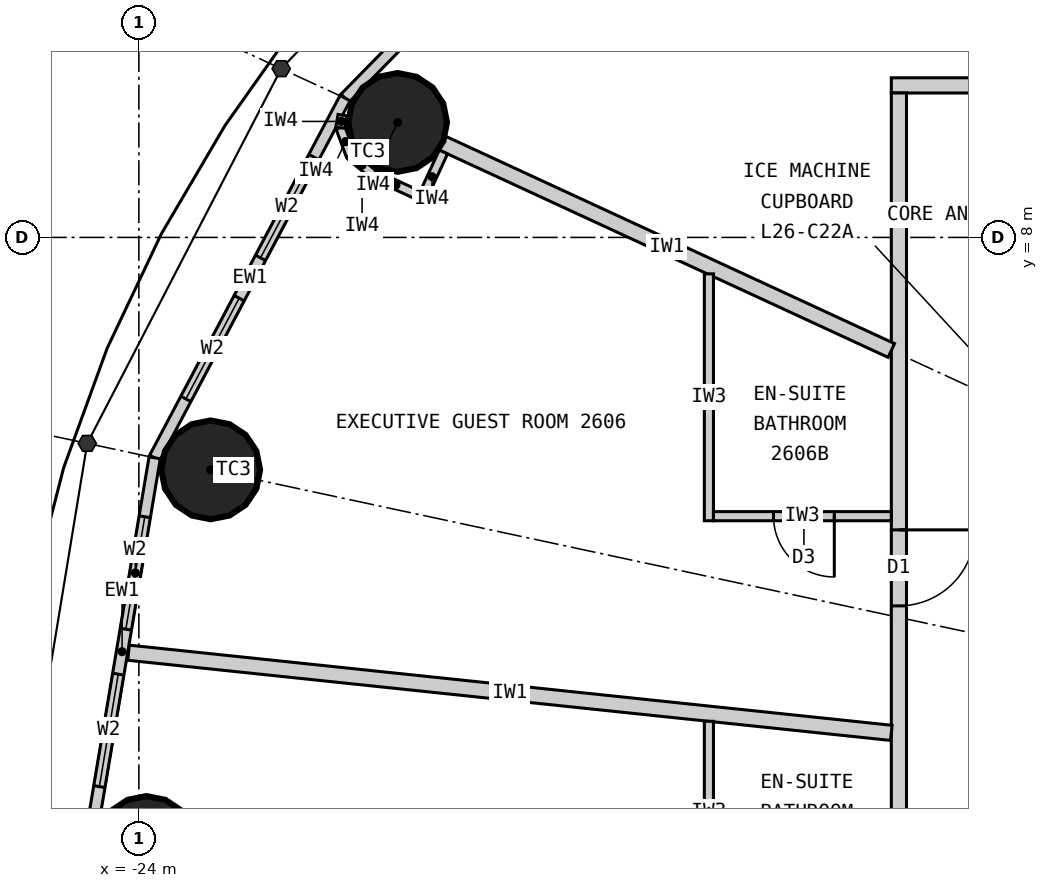
"""IFC4 building model, lengths in metres.
Left out: names, types, materials, properties, quantities, classifications, styles, units other than length and angle.
Written with IfcOpenShell. Run it as: python <this file> out.ifc"""

import sys

from ifc_helpers import new_model, si_unit, direction, frame, frame_2d, origin, origin_2d, place, context, subcontext, project, spatial, rectangle, circle, extrude, element, fill, save


model = new_model("IFC4")
c1 = context("Model", 3, precision=1e-05, world=origin(), true_north=direction((0.0, 1.0)))
c2 = subcontext(c1, "Body", "Model", "MODEL_VIEW")
j1 = project(units=[si_unit("LENGTHUNIT", "METRE"), si_unit("PLANEANGLEUNIT", "RADIAN")], contexts=[c1])
p1 = place(None, origin())
s1 = spatial("IfcSite", under=j1, at=p1, CompositionType="ELEMENT")
p2 = place(p1, origin())
s2 = spatial("IfcBuilding", under=s1, at=p2, CompositionType="ELEMENT")
p3 = place(p2, frame((0.0, 0.0, 105.6)))
s3 = spatial("IfcBuildingStorey", under=s2, at=p3, CompositionType="ELEMENT", Elevation=105.6)
for number, where, z_axis, x_axis in (
    (1, (-20.596, 9.513, 0.0), (0.0, 0.0, 1.0), (1.0, 0.0, 0.0)),
    (2, (-23.055, 4.942, 0.0), (0.0, 0.0, 1.0), (1.0, 0.0, 0.0)),
    (3, (-23.9, 0.0, 0.0), (0.0, 0.0, 1.0), (1.0, 0.0, 0.0)),
):
    element("IfcColumn", number, at=place(p3, frame(where, z_axis=z_axis, x_axis=x_axis)), inside=s3, PredefinedType="COLUMN", context=c2, shape_type="SweptSolid", body=[
        extrude(circle(Radius=0.65, at=origin_2d()), origin(), (0.0, 0.0, 1.0), 3.3),
    ])
p4 = place(p3, frame((-17.332, 13.866, 0.0), z_axis=(0.0, 0.0, 1.0), x_axis=(-0.700136650834, -0.714008872605, 0.0)))
e4 = element("IfcWall", 4, at=p4, inside=s3, PredefinedType="ELEMENTEDWALL", context=c2, shape_type="SweptSolid", body=[
    extrude(rectangle(XDim=5.649, YDim=0.15, at=frame_2d((2.825, 0.0))), origin(), (0.0, 0.0, 1.0), 3.12),
])
p5 = place(p4, frame((1.025, 0.0, 0.9)))
e5 = element("IfcOpeningElement", 5, at=p5, cuts=e4, PredefinedType="OPENING", context=c2, shape_type="SweptSolid", body=[
    extrude(rectangle(XDim=1.5, YDim=1.9, at=frame_2d((0.75, 0.95))), frame((0.0, 0.085, 0.0), z_axis=(0.0, -1.0, 0.0), x_axis=(1.0, 0.0, 0.0)), (0.0, 0.0, 1.0), 0.17),
])
p6 = place(p4, frame((3.125, 0.0, 0.9)))
e6 = element("IfcOpeningElement", 6, at=p6, cuts=e4, PredefinedType="OPENING", context=c2, shape_type="SweptSolid", body=[
    extrude(rectangle(XDim=1.5, YDim=1.9, at=frame_2d((0.75, 0.95))), frame((0.0, 0.085, 0.0), z_axis=(0.0, -1.0, 0.0), x_axis=(1.0, 0.0, 0.0)), (0.0, 0.0, 1.0), 0.17),
])
p7 = place(p3, frame((-21.287, 9.832, 0.0), z_axis=(0.0, 0.0, 1.0), x_axis=(-0.467814388454, -0.883826735257, 0.0)))
e7 = element("IfcWall", 7, at=p7, inside=s3, PredefinedType="ELEMENTEDWALL", context=c2, shape_type="SweptSolid", body=[
    extrude(rectangle(XDim=5.354, YDim=0.15, at=frame_2d((2.677, 0.0))), origin(), (0.0, 0.0, 1.0), 3.12),
])
p8 = place(p7, frame((0.877, 0.0, 0.9)))
e8 = element("IfcOpeningElement", 8, at=p8, cuts=e7, PredefinedType="OPENING", context=c2, shape_type="SweptSolid", body=[
    extrude(rectangle(XDim=1.5, YDim=1.9, at=frame_2d((0.75, 0.95))), frame((0.0, 0.085, 0.0), z_axis=(0.0, -1.0, 0.0), x_axis=(1.0, 0.0, 0.0)), (0.0, 0.0, 1.0), 0.17),
])
p9 = place(p7, frame((2.977, 0.0, 0.9)))
e9 = element("IfcOpeningElement", 9, at=p9, cuts=e7, PredefinedType="OPENING", context=c2, shape_type="SweptSolid", body=[
    extrude(rectangle(XDim=1.5, YDim=1.9, at=frame_2d((0.75, 0.95))), frame((0.0, 0.085, 0.0), z_axis=(0.0, -1.0, 0.0), x_axis=(1.0, 0.0, 0.0)), (0.0, 0.0, 1.0), 0.17),
])
p10 = place(p3, frame((-23.792, 5.1, 0.0), z_axis=(0.0, 0.0, 1.0), x_axis=(-0.165883894218, -0.986145290329, 0.0)))
e10 = element("IfcWall", 10, at=p10, inside=s3, PredefinedType="ELEMENTEDWALL", context=c2, shape_type="SweptSolid", body=[
    extrude(rectangle(XDim=5.172, YDim=0.15, at=frame_2d((2.586, 0.0))), origin(), (0.0, 0.0, 1.0), 3.12),
])
p11 = place(p10, frame((0.786, 0.0, 0.9)))
e11 = element("IfcOpeningElement", 11, at=p11, cuts=e10, PredefinedType="OPENING", context=c2, shape_type="SweptSolid", body=[
    extrude(rectangle(XDim=1.5, YDim=1.9, at=frame_2d((0.75, 0.95))), frame((0.0, 0.085, 0.0), z_axis=(0.0, -1.0, 0.0), x_axis=(1.0, 0.0, 0.0)), (0.0, 0.0, 1.0), 0.17),
])
p12 = place(p10, frame((2.886, 0.0, 0.9)))
e12 = element("IfcOpeningElement", 12, at=p12, cuts=e10, PredefinedType="OPENING", context=c2, shape_type="SweptSolid", body=[
    extrude(rectangle(XDim=1.5, YDim=1.9, at=frame_2d((0.75, 0.95))), frame((0.0, 0.085, 0.0), z_axis=(0.0, -1.0, 0.0), x_axis=(1.0, 0.0, 0.0)), (0.0, 0.0, 1.0), 0.17),
])
p13 = place(p3, frame((-14.1, 10.0, 0.0), z_axis=(0.0, 0.0, 1.0), x_axis=(1.0, 0.0, 0.0)))
e13 = element("IfcWall", 13, at=p13, inside=s3, PredefinedType="PARTITIONING", context=c2, shape_type="SweptSolid", body=[
    extrude(rectangle(XDim=10.817, YDim=0.2, at=frame_2d((5.409, 0.0))), origin(), (0.0, 0.0, 1.0), 3.12),
])
p14 = place(p13, frame((2.801, 0.0, 0.0)))
e14 = element("IfcOpeningElement", 14, at=p14, cuts=e13, PredefinedType="OPENING", context=c2, shape_type="SweptSolid", body=[
    extrude(rectangle(XDim=1.0, YDim=2.2, at=frame_2d((0.5, 1.1))), frame((0.0, 0.11, 0.0), z_axis=(0.0, -1.0, 0.0), x_axis=(1.0, 0.0, 0.0)), (0.0, 0.0, 1.0), 0.22),
])
p15 = place(p3, frame((-14.0, 9.9, 0.0), z_axis=(0.0, 0.0, 1.0), x_axis=(0.0, -1.0, 0.0)))
e15 = element("IfcWall", 15, at=p15, inside=s3, PredefinedType="PARTITIONING", context=c2, shape_type="SweptSolid", body=[
    extrude(rectangle(XDim=19.8, YDim=0.2, at=frame_2d((9.9, 0.0))), origin(), (0.0, 0.0, 1.0), 3.12),
])
p16 = place(p15, frame((5.748, 0.0, 0.0)))
e16 = element("IfcOpeningElement", 16, at=p16, cuts=e15, PredefinedType="OPENING", context=c2, shape_type="SweptSolid", body=[
    extrude(rectangle(XDim=1.0, YDim=2.2, at=frame_2d((0.5, 1.1))), frame((0.0, 0.11, 0.0), z_axis=(0.0, -1.0, 0.0), x_axis=(1.0, 0.0, 0.0)), (0.0, 0.0, 1.0), 0.22),
])
p17 = place(p15, frame((10.778, 0.0, 0.0)))
e17 = element("IfcOpeningElement", 17, at=p17, cuts=e15, PredefinedType="OPENING", context=c2, shape_type="SweptSolid", body=[
    extrude(rectangle(XDim=1.0, YDim=2.2, at=frame_2d((0.5, 1.1))), frame((0.0, 0.11, 0.0), z_axis=(0.0, -1.0, 0.0), x_axis=(1.0, 0.0, 0.0)), (0.0, 0.0, 1.0), 0.22),
])
p18 = place(p15, frame((15.282, 0.0, 0.0)))
e18 = element("IfcOpeningElement", 18, at=p18, cuts=e15, PredefinedType="OPENING", context=c2, shape_type="SweptSolid", body=[
    extrude(rectangle(XDim=1.0, YDim=2.2, at=frame_2d((0.5, 1.1))), frame((0.0, 0.11, 0.0), z_axis=(0.0, -1.0, 0.0), x_axis=(1.0, 0.0, 0.0)), (0.0, 0.0, 1.0), 0.22),
])
p19 = place(p3, frame((-14.1, 6.512, 0.0), z_axis=(0.0, 0.0, 1.0), x_axis=(-0.907833019998, 0.419331858797, 0.0)))
e19 = element("IfcWall", 19, at=p19, inside=s3, PredefinedType="PARTITIONING", context=c2, shape_type="SweptSolid", body=[
    extrude(rectangle(XDim=6.505, YDim=0.2, at=frame_2d((3.252, 0.0))), origin(), (0.0, 0.0, 1.0), 2.22),
])
p20 = place(p3, frame((-14.1, 1.482, 0.0), z_axis=(0.0, 0.0, 1.0), x_axis=(-0.994523202615, 0.104516024894, 0.0)))
e20 = element("IfcWall", 20, at=p20, inside=s3, PredefinedType="PARTITIONING", context=c2, shape_type="SweptSolid", body=[
    extrude(rectangle(XDim=10.091, YDim=0.2, at=frame_2d((5.045, 0.0))), origin(), (0.0, 0.0, 1.0), 2.37),
])
p21 = place(p3, frame((-16.5, 7.521, 0.0), z_axis=(0.0, 0.0, 1.0), x_axis=(0.0, -1.0, 0.0)))
e21 = element("IfcWall", 21, at=p21, inside=s3, PredefinedType="PARTITIONING", context=c2, shape_type="SweptSolid", body=[
    extrude(rectangle(XDim=3.249, YDim=0.12, at=frame_2d((1.624, 0.0))), origin(), (0.0, 0.0, 1.0), 3.12),
])
p22 = place(p3, frame((-14.1, 4.333, 0.0), z_axis=(0.0, 0.0, 1.0), x_axis=(-1.0, 0.0, 0.0)))
e22 = element("IfcWall", 22, at=p22, inside=s3, PredefinedType="PARTITIONING", context=c2, shape_type="SweptSolid", body=[
    extrude(rectangle(XDim=2.34, YDim=0.12, at=frame_2d((1.17, 0.0))), origin(), (0.0, 0.0, 1.0), 3.12),
])
p23 = place(p22, frame((0.75, 0.0, 0.0)))
e23 = element("IfcOpeningElement", 23, at=p23, cuts=e22, PredefinedType="OPENING", context=c2, shape_type="SweptSolid", body=[
    extrude(rectangle(XDim=0.8, YDim=2.1, at=frame_2d((0.4, 1.05))), frame((0.0, 0.07, 0.0), z_axis=(0.0, -1.0, 0.0), x_axis=(1.0, 0.0, 0.0)), (0.0, 0.0, 1.0), 0.14),
])
p24 = place(p3, frame((-16.5, 1.634, 0.0), z_axis=(0.0, 0.0, 1.0), x_axis=(0.0, -1.0, 0.0)))
e24 = element("IfcWall", 24, at=p24, inside=s3, PredefinedType="PARTITIONING", context=c2, shape_type="SweptSolid", body=[
    extrude(rectangle(XDim=2.392, YDim=0.12, at=frame_2d((1.196, 0.0))), origin(), (0.0, 0.0, 1.0), 3.12),
])
p25 = place(p3, frame((-19.993, 9.124, 0.0), z_axis=(0.0, 0.0, 1.0), x_axis=(-0.419447394118, -0.90777964483, 0.0)))
e25 = element("IfcWall", 25, at=p25, inside=s3, PredefinedType="PARTITIONING", context=c2, shape_type="SweptSolid", body=[
    extrude(rectangle(XDim=0.716, YDim=0.12, at=frame_2d((0.358, 0.0))), origin(), (0.0, 0.0, 1.0), 3.12),
])
p26 = place(p3, frame((-20.323, 8.554, 0.0), z_axis=(0.0, 0.0, 1.0), x_axis=(-0.907750418698, 0.419510640333, 0.0)))
e26 = element("IfcWall", 26, at=p26, inside=s3, PredefinedType="PARTITIONING", context=c2, shape_type="SweptSolid", body=[
    extrude(rectangle(XDim=0.65, YDim=0.12, at=frame_2d((0.325, 0.0))), origin(), (0.0, 0.0, 1.0), 3.12),
])
p27 = place(p3, frame((-20.913, 8.827, 0.0), z_axis=(0.0, 0.0, 1.0), x_axis=(-0.76847706684, 0.639877330229, 0.0)))
e27 = element("IfcWall", 27, at=p27, inside=s3, PredefinedType="PARTITIONING", context=c2, shape_type="SweptSolid", body=[
    extrude(rectangle(XDim=0.391, YDim=0.12, at=frame_2d((0.196, 0.0))), origin(), (0.0, 0.0, 1.0), 3.12),
])
p28 = place(p3, frame((-21.213, 9.077, 0.0), z_axis=(0.0, 0.0, 1.0), x_axis=(-0.345647532133, 0.938364419365, 0.0)))
e28 = element("IfcWall", 28, at=p28, inside=s3, PredefinedType="PARTITIONING", context=c2, shape_type="SweptSolid", body=[
    extrude(rectangle(XDim=0.391, YDim=0.12, at=frame_2d((0.196, 0.0))), origin(), (0.0, 0.0, 1.0), 3.12),
])
p29 = place(p3, frame((-21.348, 9.444, 0.0), z_axis=(0.0, 0.0, 1.0), x_axis=(0.170349493321, 0.985383707053, 0.0)))
e29 = element("IfcWall", 29, at=p29, inside=s3, PredefinedType="PARTITIONING", context=c2, shape_type="SweptSolid", body=[
    extrude(rectangle(XDim=0.166, YDim=0.12, at=frame_2d((0.083, 0.0))), origin(), (0.0, 0.0, 1.0), 3.12),
])
p30 = place(p8, origin())
e30 = element("IfcWindow", 30, at=p30, inside=s3, PartitioningType="SINGLE_PANEL", PredefinedType="WINDOW", context=c2, shape_type="SweptSolid", body=[
    extrude(rectangle(XDim=1.5, YDim=1.9, at=frame_2d((0.75, 0.95))), frame((0.0, 0.03, 0.0), z_axis=(0.0, -1.0, 0.0), x_axis=(1.0, 0.0, 0.0)), (0.0, 0.0, 1.0), 0.06),
])
fill(e8, e30)
p31 = place(p9, origin())
e31 = element("IfcWindow", 31, at=p31, inside=s3, PartitioningType="SINGLE_PANEL", PredefinedType="WINDOW", context=c2, shape_type="SweptSolid", body=[
    extrude(rectangle(XDim=1.5, YDim=1.9, at=frame_2d((0.75, 0.95))), frame((0.0, 0.03, 0.0), z_axis=(0.0, -1.0, 0.0), x_axis=(1.0, 0.0, 0.0)), (0.0, 0.0, 1.0), 0.06),
])
fill(e9, e31)
p32 = place(p11, origin())
e32 = element("IfcWindow", 32, at=p32, inside=s3, PartitioningType="SINGLE_PANEL", PredefinedType="WINDOW", context=c2, shape_type="SweptSolid", body=[
    extrude(rectangle(XDim=1.5, YDim=1.9, at=frame_2d((0.75, 0.95))), frame((0.0, 0.03, 0.0), z_axis=(0.0, -1.0, 0.0), x_axis=(1.0, 0.0, 0.0)), (0.0, 0.0, 1.0), 0.06),
])
fill(e11, e32)
p33 = place(p12, origin())
e33 = element("IfcWindow", 33, at=p33, inside=s3, PartitioningType="SINGLE_PANEL", PredefinedType="WINDOW", context=c2, shape_type="SweptSolid", body=[
    extrude(rectangle(XDim=1.5, YDim=1.9, at=frame_2d((0.75, 0.95))), frame((0.0, 0.03, 0.0), z_axis=(0.0, -1.0, 0.0), x_axis=(1.0, 0.0, 0.0)), (0.0, 0.0, 1.0), 0.06),
])
fill(e12, e33)
p34 = place(p23, origin())
e34 = element("IfcDoor", 34, at=p34, inside=s3, OperationType="SINGLE_SWING_LEFT", PredefinedType="DOOR", context=c2, shape_type="SweptSolid", body=[
    extrude(rectangle(XDim=0.8, YDim=2.1, at=frame_2d((0.4, 1.05))), frame((0.0, 0.025, 0.0), z_axis=(0.0, -1.0, 0.0), x_axis=(1.0, 0.0, 0.0)), (0.0, 0.0, 1.0), 0.05),
])
fill(e23, e34)
p35 = place(p16, origin())
e35 = element("IfcDoor", 35, at=p35, inside=s3, OperationType="SINGLE_SWING_LEFT", PredefinedType="DOOR", context=c2, shape_type="SweptSolid", body=[
    extrude(rectangle(XDim=1.0, YDim=2.2, at=frame_2d((0.5, 1.1))), frame((0.0, 0.025, 0.0), z_axis=(0.0, -1.0, 0.0), x_axis=(1.0, 0.0, 0.0)), (0.0, 0.0, 1.0), 0.05),
])
fill(e16, e35)
save(model, sys.argv[1])
